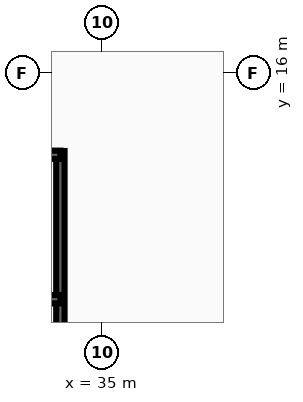
"""IFC4 building model, lengths in metres.
Left out: names, types, materials, properties, quantities, classifications, styles, units other than length and angle.
Written with IfcOpenShell. Run it as: python <this file> out.ifc"""

import sys

from ifc_helpers import new_model, si_unit, direction, frame, frame_2d, origin, place, context, subcontext, project, spatial, rectangle, extrude, element, save


model = new_model("IFC4")
c1 = context("Model", 3, precision=1e-05, world=origin(), true_north=direction((0.0, 1.0)))
c2 = subcontext(c1, "Body", "Model", "MODEL_VIEW")
j1 = project(units=[si_unit("LENGTHUNIT", "METRE"), si_unit("PLANEANGLEUNIT", "RADIAN")], contexts=[c1])
p1 = place(None, origin())
s1 = spatial("IfcSite", under=j1, at=p1, CompositionType="ELEMENT")
p2 = place(p1, origin())
s2 = spatial("IfcBuilding", under=s1, at=p2, CompositionType="ELEMENT")
p3 = place(p2, frame((0.0, 0.0, -9.6)))
s3 = spatial("IfcBuildingStorey", under=s2, at=p3, CompositionType="ELEMENT", Elevation=-9.6)
p4 = place(p3, frame((33.9, -9.2, 0.0), z_axis=(0.0, 0.0, 1.0), x_axis=(0.0, 1.0, 0.0)))
e1 = element("IfcWall", 1, at=p4, inside=s3, PredefinedType="SHEAR", context=c2, shape_type="SweptSolid", body=[
    extrude(rectangle(XDim=23.15, YDim=0.22, at=frame_2d((11.575, 0.0))), origin(), (0.0, 0.0, 1.0), 4.54),
])
for number, where, z_axis, x_axis in (
    (2, (27.7, 13.85, 0.0), (0.0, 0.0, 1.0), (1.0, 0.0, 0.0)),
    (3, (27.7, 10.05, 0.0), (0.0, 0.0, 1.0), (1.0, 0.0, 0.0)),
):
    element("IfcWall", number, at=place(p3, frame(where, z_axis=z_axis, x_axis=x_axis)), inside=s3, PredefinedType="SHEAR", context=c2, shape_type="SweptSolid", body=[
        extrude(rectangle(XDim=6.2, YDim=0.22, at=frame_2d((3.1, 0.0))), origin(), (0.0, 0.0, 1.0), 2.04),
    ])
save(model, sys.argv[1])
